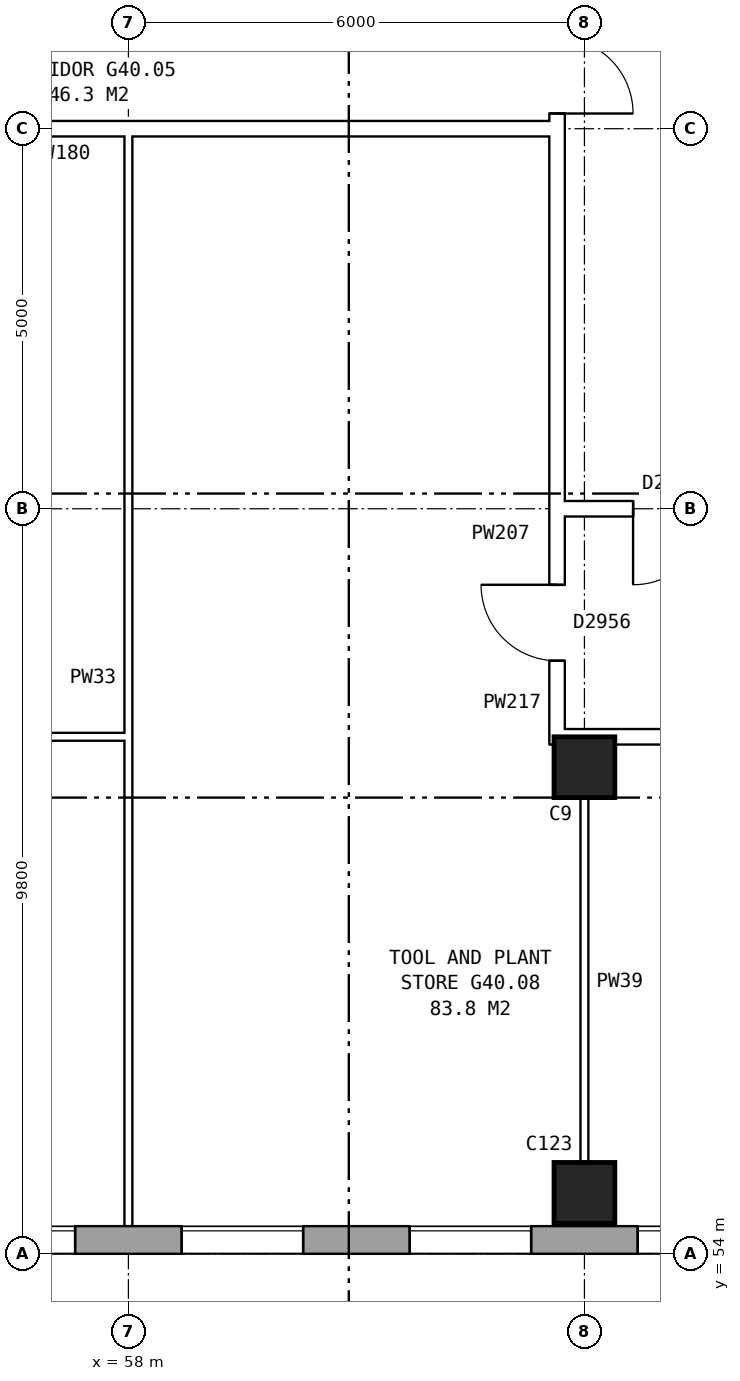
"""IFC4 building model, lengths in metres.
Left out: names, types, materials, properties, quantities, classifications, styles, units other than length and angle.
Written with IfcOpenShell. Run it as: python <this file> out.ifc"""

import sys

from ifc_helpers import new_model, si_unit, direction, frame, frame_2d, origin, origin_2d, place, context, subcontext, project, spatial, rectangle, extrude, element, fill, save


model = new_model("IFC4")
c1 = context("Model", 3, precision=1e-05, world=origin(), true_north=direction((0.0, 1.0)))
c2 = subcontext(c1, "Body", "Model", "MODEL_VIEW")
j1 = project(units=[si_unit("LENGTHUNIT", "METRE"), si_unit("PLANEANGLEUNIT", "RADIAN")], contexts=[c1])
p1 = place(None, origin())
s1 = spatial("IfcSite", under=j1, at=p1, CompositionType="ELEMENT")
p2 = place(p1, origin())
s2 = spatial("IfcBuilding", under=s1, at=p2, CompositionType="ELEMENT")
p3 = place(p2, frame((0.0, 0.0, 142.3)))
s3 = spatial("IfcBuildingStorey", under=s2, at=p3, CompositionType="ELEMENT", Elevation=142.3)
for number, where, z_axis, x_axis in (
    (1, (64.0, 54.8, 0.0), (0.0, 0.0, 1.0), (1.0, 0.0, 0.0)),
    (2, (64.0, 60.4, 0.0), (0.0, 0.0, 1.0), (1.0, 0.0, 0.0)),
):
    element("IfcColumn", number, at=place(p3, frame(where, z_axis=z_axis, x_axis=x_axis)), inside=s3, PredefinedType="COLUMN", context=c2, shape_type="SweptSolid", body=[
        extrude(rectangle(XDim=0.8, YDim=0.8, at=origin_2d()), origin(), (0.0, 0.0, 1.0), 5.6),
    ])
p4 = place(p3, frame((31.575, 54.18, 0.0), z_axis=(0.0, 0.0, 1.0), x_axis=(1.0, 0.0, 0.0)))
e3 = element("IfcWall", 3, at=p4, inside=s3, PredefinedType="STANDARD", context=c2, shape_type="SweptSolid", body=[
    extrude(rectangle(XDim=41.351, YDim=0.36, at=frame_2d((20.675, 0.0))), origin(), (0.0, 0.0, 1.0), 5.6),
])
p5 = place(p4, frame((3.125, 0.0, 0.15)))
e4 = element("IfcOpeningElement", 4, at=p5, cuts=e3, PredefinedType="OPENING", context=c2, shape_type="SweptSolid", body=[
    extrude(rectangle(XDim=1.6, YDim=2.4, at=frame_2d((0.8, 1.2))), frame((0.0, 0.19, 0.0), z_axis=(0.0, -1.0, 0.0), x_axis=(1.0, 0.0, 0.0)), (0.0, 0.0, 1.0), 0.38),
])
p6 = place(p4, frame((6.125, 0.0, 0.15)))
e5 = element("IfcOpeningElement", 5, at=p6, cuts=e3, PredefinedType="OPENING", context=c2, shape_type="SweptSolid", body=[
    extrude(rectangle(XDim=1.6, YDim=2.4, at=frame_2d((0.8, 1.2))), frame((0.0, 0.19, 0.0), z_axis=(0.0, -1.0, 0.0), x_axis=(1.0, 0.0, 0.0)), (0.0, 0.0, 1.0), 0.38),
])
p7 = place(p4, frame((9.125, 0.0, 0.15)))
e6 = element("IfcOpeningElement", 6, at=p7, cuts=e3, PredefinedType="OPENING", context=c2, shape_type="SweptSolid", body=[
    extrude(rectangle(XDim=1.6, YDim=2.4, at=frame_2d((0.8, 1.2))), frame((0.0, 0.19, 0.0), z_axis=(0.0, -1.0, 0.0), x_axis=(1.0, 0.0, 0.0)), (0.0, 0.0, 1.0), 0.38),
])
p8 = place(p4, frame((12.125, 0.0, 0.15)))
e7 = element("IfcOpeningElement", 7, at=p8, cuts=e3, PredefinedType="OPENING", context=c2, shape_type="SweptSolid", body=[
    extrude(rectangle(XDim=1.6, YDim=2.4, at=frame_2d((0.8, 1.2))), frame((0.0, 0.19, 0.0), z_axis=(0.0, -1.0, 0.0), x_axis=(1.0, 0.0, 0.0)), (0.0, 0.0, 1.0), 0.38),
])
p9 = place(p4, frame((15.125, 0.0, 0.15)))
e8 = element("IfcOpeningElement", 8, at=p9, cuts=e3, PredefinedType="OPENING", context=c2, shape_type="SweptSolid", body=[
    extrude(rectangle(XDim=1.6, YDim=2.4, at=frame_2d((0.8, 1.2))), frame((0.0, 0.19, 0.0), z_axis=(0.0, -1.0, 0.0), x_axis=(1.0, 0.0, 0.0)), (0.0, 0.0, 1.0), 0.38),
])
p10 = place(p4, frame((18.125, 0.0, 0.15)))
e9 = element("IfcOpeningElement", 9, at=p10, cuts=e3, PredefinedType="OPENING", context=c2, shape_type="SweptSolid", body=[
    extrude(rectangle(XDim=1.6, YDim=2.4, at=frame_2d((0.8, 1.2))), frame((0.0, 0.19, 0.0), z_axis=(0.0, -1.0, 0.0), x_axis=(1.0, 0.0, 0.0)), (0.0, 0.0, 1.0), 0.38),
])
p11 = place(p4, frame((21.125, 0.0, 0.15)))
e10 = element("IfcOpeningElement", 10, at=p11, cuts=e3, PredefinedType="OPENING", context=c2, shape_type="SweptSolid", body=[
    extrude(rectangle(XDim=1.6, YDim=2.4, at=frame_2d((0.8, 1.2))), frame((0.0, 0.19, 0.0), z_axis=(0.0, -1.0, 0.0), x_axis=(1.0, 0.0, 0.0)), (0.0, 0.0, 1.0), 0.38),
])
p12 = place(p4, frame((24.125, 0.0, 0.15)))
e11 = element("IfcOpeningElement", 11, at=p12, cuts=e3, PredefinedType="OPENING", context=c2, shape_type="SweptSolid", body=[
    extrude(rectangle(XDim=1.6, YDim=2.4, at=frame_2d((0.8, 1.2))), frame((0.0, 0.19, 0.0), z_axis=(0.0, -1.0, 0.0), x_axis=(1.0, 0.0, 0.0)), (0.0, 0.0, 1.0), 0.38),
])
p13 = place(p4, frame((27.125, 0.0, 0.15)))
e12 = element("IfcOpeningElement", 12, at=p13, cuts=e3, PredefinedType="OPENING", context=c2, shape_type="SweptSolid", body=[
    extrude(rectangle(XDim=1.6, YDim=2.4, at=frame_2d((0.8, 1.2))), frame((0.0, 0.19, 0.0), z_axis=(0.0, -1.0, 0.0), x_axis=(1.0, 0.0, 0.0)), (0.0, 0.0, 1.0), 0.38),
])
p14 = place(p4, frame((30.125, 0.0, 0.15)))
e13 = element("IfcOpeningElement", 13, at=p14, cuts=e3, PredefinedType="OPENING", context=c2, shape_type="SweptSolid", body=[
    extrude(rectangle(XDim=1.6, YDim=2.4, at=frame_2d((0.8, 1.2))), frame((0.0, 0.19, 0.0), z_axis=(0.0, -1.0, 0.0), x_axis=(1.0, 0.0, 0.0)), (0.0, 0.0, 1.0), 0.38),
])
p15 = place(p4, frame((33.125, 0.0, 0.15)))
e14 = element("IfcOpeningElement", 14, at=p15, cuts=e3, PredefinedType="OPENING", context=c2, shape_type="SweptSolid", body=[
    extrude(rectangle(XDim=1.6, YDim=2.4, at=frame_2d((0.8, 1.2))), frame((0.0, 0.19, 0.0), z_axis=(0.0, -1.0, 0.0), x_axis=(1.0, 0.0, 0.0)), (0.0, 0.0, 1.0), 0.38),
])
p16 = place(p4, frame((36.125, 0.0, 0.15)))
e15 = element("IfcOpeningElement", 15, at=p16, cuts=e3, PredefinedType="OPENING", context=c2, shape_type="SweptSolid", body=[
    extrude(rectangle(XDim=1.6, YDim=2.4, at=frame_2d((0.8, 1.2))), frame((0.0, 0.19, 0.0), z_axis=(0.0, -1.0, 0.0), x_axis=(1.0, 0.0, 0.0)), (0.0, 0.0, 1.0), 0.38),
])
p17 = place(p4, frame((39.125, 0.0, 0.15)))
e16 = element("IfcOpeningElement", 16, at=p17, cuts=e3, PredefinedType="OPENING", context=c2, shape_type="SweptSolid", body=[
    extrude(rectangle(XDim=1.6, YDim=2.4, at=frame_2d((0.8, 1.2))), frame((0.0, 0.19, 0.0), z_axis=(0.0, -1.0, 0.0), x_axis=(1.0, 0.0, 0.0)), (0.0, 0.0, 1.0), 0.38),
])
p18 = place(p3, frame((63.64, 63.9, 0.0), z_axis=(0.0, 0.0, 1.0), x_axis=(0.0, 1.0, 0.0)))
e17 = element("IfcWall", 17, at=p18, inside=s3, PredefinedType="PARTITIONING", context=c2, shape_type="SweptSolid", body=[
    extrude(rectangle(XDim=12.2, YDim=0.2, at=frame_2d((6.1, 0.0))), origin(), (0.0, 0.0, 1.0), 5.6),
])
p19 = place(p18, frame((5.1, 0.0, 0.0)))
e18 = element("IfcOpeningElement", 18, at=p19, cuts=e17, PredefinedType="OPENING", context=c2, shape_type="SweptSolid", body=[
    extrude(rectangle(XDim=2.0, YDim=2.1, at=frame_2d((1.0, 1.05))), frame((0.0, 0.11, 0.0), z_axis=(0.0, -1.0, 0.0), x_axis=(1.0, 0.0, 0.0)), (0.0, 0.0, 1.0), 0.22),
])
p20 = place(p3, frame((63.54, 60.8, 0.0), z_axis=(0.0, 0.0, 1.0), x_axis=(1.0, 0.0, 0.0)))
e19 = element("IfcWall", 19, at=p20, inside=s3, PredefinedType="PARTITIONING", context=c2, shape_type="SweptSolid", body=[
    extrude(rectangle(XDim=12.22, YDim=0.2, at=frame_2d((6.11, 0.0))), origin(), (0.0, 0.0, 1.0), 5.6),
])
p21 = place(p20, frame((2.96, 0.0, 0.0)))
e20 = element("IfcOpeningElement", 20, at=p21, cuts=e19, PredefinedType="OPENING", context=c2, shape_type="SweptSolid", body=[
    extrude(rectangle(XDim=1.0, YDim=2.1, at=frame_2d((0.5, 1.05))), frame((0.0, 0.11, 0.0), z_axis=(0.0, -1.0, 0.0), x_axis=(1.0, 0.0, 0.0)), (0.0, 0.0, 1.0), 0.22),
])
p22 = place(p20, frame((8.78, 0.0, 0.0)))
e21 = element("IfcOpeningElement", 21, at=p22, cuts=e19, PredefinedType="OPENING", context=c2, shape_type="SweptSolid", body=[
    extrude(rectangle(XDim=1.0, YDim=2.1, at=frame_2d((0.5, 1.05))), frame((0.0, 0.11, 0.0), z_axis=(0.0, -1.0, 0.0), x_axis=(1.0, 0.0, 0.0)), (0.0, 0.0, 1.0), 0.22),
])
p23 = place(p3, frame((47.9, 60.8, 0.0), z_axis=(0.0, 0.0, 1.0), x_axis=(1.0, 0.0, 0.0)))
e22 = element("IfcWall", 22, at=p23, inside=s3, PredefinedType="PARTITIONING", context=c2, shape_type="SweptSolid", body=[
    extrude(rectangle(XDim=10.15, YDim=0.1, at=frame_2d((5.075, 0.0))), origin(), (0.0, 0.0, 1.0), 5.6),
])
p24 = place(p23, frame((4.8, 0.0, 0.0)))
e23 = element("IfcOpeningElement", 23, at=p24, cuts=e22, PredefinedType="OPENING", context=c2, shape_type="SweptSolid", body=[
    extrude(rectangle(XDim=1.0, YDim=2.1, at=frame_2d((0.5, 1.05))), frame((0.0, 0.06, 0.0), z_axis=(0.0, -1.0, 0.0), x_axis=(1.0, 0.0, 0.0)), (0.0, 0.0, 1.0), 0.12),
])
p25 = place(p3, frame((63.54, 63.8, 0.0), z_axis=(0.0, 0.0, 1.0), x_axis=(1.0, 0.0, 0.0)))
e24 = element("IfcWall", 24, at=p25, inside=s3, PredefinedType="PARTITIONING", context=c2, shape_type="SweptSolid", body=[
    extrude(rectangle(XDim=3.1, YDim=0.2, at=frame_2d((1.55, 0.0))), origin(), (0.0, 0.0, 1.0), 5.6),
])
p26 = place(p25, frame((1.1, 0.0, 0.0)))
e25 = element("IfcOpeningElement", 25, at=p26, cuts=e24, PredefinedType="OPENING", context=c2, shape_type="SweptSolid", body=[
    extrude(rectangle(XDim=1.0, YDim=2.1, at=frame_2d((0.5, 1.05))), frame((0.0, 0.11, 0.0), z_axis=(0.0, -1.0, 0.0), x_axis=(1.0, 0.0, 0.0)), (0.0, 0.0, 1.0), 0.22),
])
p27 = place(p3, frame((44.36, 68.8, 0.0), z_axis=(0.0, 0.0, 1.0), x_axis=(1.0, 0.0, 0.0)))
e26 = element("IfcWall", 26, at=p27, inside=s3, PredefinedType="PARTITIONING", context=c2, shape_type="SweptSolid", body=[
    extrude(rectangle(XDim=19.28, YDim=0.2, at=frame_2d((9.64, 0.0))), origin(), (0.0, 0.0, 1.0), 5.6),
])
p28 = place(p27, frame((6.32, 0.0, 0.0)))
e27 = element("IfcOpeningElement", 27, at=p28, cuts=e26, PredefinedType="OPENING", context=c2, shape_type="SweptSolid", body=[
    extrude(rectangle(XDim=1.0, YDim=2.1, at=frame_2d((0.5, 1.05))), frame((0.0, 0.11, 0.0), z_axis=(0.0, -1.0, 0.0), x_axis=(1.0, 0.0, 0.0)), (0.0, 0.0, 1.0), 0.22),
])
p29 = place(p3, frame((58.0, 54.24, 0.0), z_axis=(0.0, 0.0, 1.0), x_axis=(0.0, 1.0, 0.0)))
e28 = element("IfcWall", 28, at=p29, inside=s3, PredefinedType="PARTITIONING", context=c2, shape_type="SweptSolid", body=[
    extrude(rectangle(XDim=14.66, YDim=0.1, at=frame_2d((7.33, 0.0))), origin(), (0.0, 0.0, 1.0), 5.6),
])
p30 = place(p3, frame((63.64, 60.7, 0.0), z_axis=(0.0, 0.0, 1.0), x_axis=(0.0, 1.0, 0.0)))
e29 = element("IfcWall", 29, at=p30, inside=s3, PredefinedType="PARTITIONING", context=c2, shape_type="SweptSolid", body=[
    extrude(rectangle(XDim=3.2, YDim=0.2, at=frame_2d((1.6, 0.0))), origin(), (0.0, 0.0, 1.0), 5.6),
])
p31 = place(p30, frame((1.1, 0.0, 0.0)))
e30 = element("IfcOpeningElement", 30, at=p31, cuts=e29, PredefinedType="OPENING", context=c2, shape_type="SweptSolid", body=[
    extrude(rectangle(XDim=1.0, YDim=2.1, at=frame_2d((0.5, 1.05))), frame((0.0, 0.11, 0.0), z_axis=(0.0, -1.0, 0.0), x_axis=(1.0, 0.0, 0.0)), (0.0, 0.0, 1.0), 0.22),
])
p32 = place(p3, frame((64.0, 54.24, 0.0), z_axis=(0.0, 0.0, 1.0), x_axis=(0.0, 1.0, 0.0)))
e31 = element("IfcWall", 31, at=p32, inside=s3, PredefinedType="PARTITIONING", context=c2, shape_type="SweptSolid", body=[
    extrude(rectangle(XDim=6.66, YDim=0.1, at=frame_2d((3.33, 0.0))), origin(), (0.0, 0.0, 1.0), 5.6),
])
p33 = place(p12, origin())
e32 = element("IfcWindow", 32, at=p33, inside=s3, PartitioningType="SINGLE_PANEL", PredefinedType="WINDOW", context=c2, shape_type="SweptSolid", body=[
    extrude(rectangle(XDim=1.6, YDim=2.4, at=frame_2d((0.8, 1.2))), frame((0.0, 0.15, 0.0), z_axis=(0.0, -1.0, 0.0), x_axis=(1.0, 0.0, 0.0)), (0.0, 0.0, 1.0), 0.06),
])
fill(e11, e32)
p34 = place(p13, origin())
e33 = element("IfcWindow", 33, at=p34, inside=s3, PartitioningType="SINGLE_PANEL", PredefinedType="WINDOW", context=c2, shape_type="SweptSolid", body=[
    extrude(rectangle(XDim=1.6, YDim=2.4, at=frame_2d((0.8, 1.2))), frame((0.0, 0.15, 0.0), z_axis=(0.0, -1.0, 0.0), x_axis=(1.0, 0.0, 0.0)), (0.0, 0.0, 1.0), 0.06),
])
fill(e12, e33)
p35 = place(p14, origin())
e34 = element("IfcWindow", 34, at=p35, inside=s3, PartitioningType="SINGLE_PANEL", PredefinedType="WINDOW", context=c2, shape_type="SweptSolid", body=[
    extrude(rectangle(XDim=1.6, YDim=2.4, at=frame_2d((0.8, 1.2))), frame((0.0, 0.15, 0.0), z_axis=(0.0, -1.0, 0.0), x_axis=(1.0, 0.0, 0.0)), (0.0, 0.0, 1.0), 0.06),
])
fill(e13, e34)
p36 = place(p15, origin())
e35 = element("IfcWindow", 35, at=p36, inside=s3, PartitioningType="SINGLE_PANEL", PredefinedType="WINDOW", context=c2, shape_type="SweptSolid", body=[
    extrude(rectangle(XDim=1.6, YDim=2.4, at=frame_2d((0.8, 1.2))), frame((0.0, 0.15, 0.0), z_axis=(0.0, -1.0, 0.0), x_axis=(1.0, 0.0, 0.0)), (0.0, 0.0, 1.0), 0.06),
])
fill(e14, e35)
p37 = place(p19, frame((2.0, 0.0, 0.0), z_axis=(0.0, 0.0, 1.0), x_axis=(-1.0, 0.0, 0.0)))
e36 = element("IfcDoor", 36, at=p37, inside=s3, OperationType="DOUBLE_DOOR_SINGLE_SWING", PredefinedType="DOOR", context=c2, shape_type="SweptSolid", body=[
    extrude(rectangle(XDim=2.0, YDim=2.1, at=frame_2d((1.0, 1.05))), frame((0.0, 0.025, 0.0), z_axis=(0.0, -1.0, 0.0), x_axis=(1.0, 0.0, 0.0)), (0.0, 0.0, 1.0), 0.05),
])
fill(e18, e36)
p38 = place(p26, frame((1.0, 0.0, 0.0), z_axis=(0.0, 0.0, 1.0), x_axis=(-1.0, 0.0, 0.0)))
e37 = element("IfcDoor", 37, at=p38, inside=s3, OperationType="SINGLE_SWING_RIGHT", PredefinedType="DOOR", context=c2, shape_type="SweptSolid", body=[
    extrude(rectangle(XDim=1.0, YDim=2.1, at=frame_2d((0.5, 1.05))), frame((0.0, 0.025, 0.0), z_axis=(0.0, -1.0, 0.0), x_axis=(1.0, 0.0, 0.0)), (0.0, 0.0, 1.0), 0.05),
])
fill(e25, e37)
p39 = place(p31, origin())
e38 = element("IfcDoor", 38, at=p39, inside=s3, OperationType="SINGLE_SWING_RIGHT", PredefinedType="DOOR", context=c2, shape_type="SweptSolid", body=[
    extrude(rectangle(XDim=1.0, YDim=2.1, at=frame_2d((0.5, 1.05))), frame((0.0, 0.025, 0.0), z_axis=(0.0, -1.0, 0.0), x_axis=(1.0, 0.0, 0.0)), (0.0, 0.0, 1.0), 0.05),
])
fill(e30, e38)
save(model, sys.argv[1])
